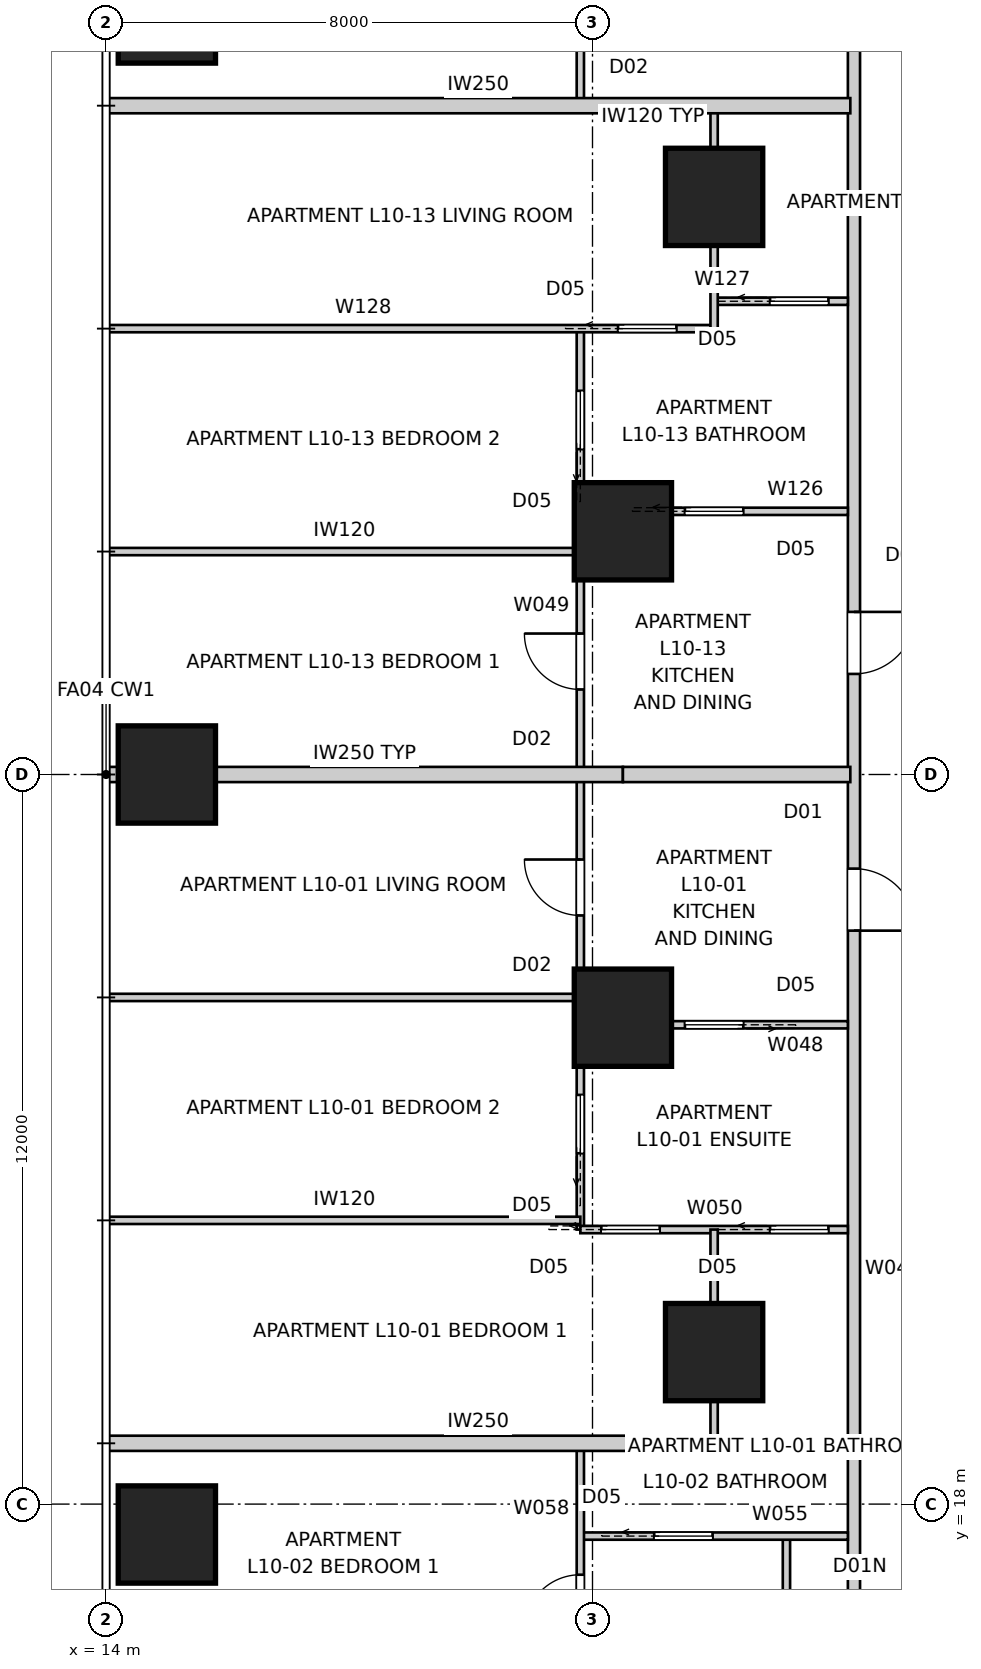
"""IFC4 building model, lengths in metres.
Left out: names, types, materials, properties, quantities, classifications, styles, units other than length and angle.
Written with IfcOpenShell. Run it as: python <this file> out.ifc"""

import sys

from ifc_helpers import new_model, si_unit, direction, frame, frame_2d, origin, origin_2d, place, context, subcontext, project, spatial, rectangle, extrude, element, fill, save


model = new_model("IFC4")
c1 = context("Model", 3, precision=1e-05, world=origin(), true_north=direction((0.0, 1.0)))
c2 = subcontext(c1, "Body", "Model", "MODEL_VIEW")
j1 = project(units=[si_unit("LENGTHUNIT", "METRE"), si_unit("PLANEANGLEUNIT", "RADIAN")], contexts=[c1])
p1 = place(None, origin())
s1 = spatial("IfcSite", under=j1, at=p1, CompositionType="ELEMENT")
p2 = place(p1, origin())
s2 = spatial("IfcBuilding", under=s1, at=p2, CompositionType="ELEMENT")
p3 = place(p2, frame((0.0, 0.0, 38.8)))
s3 = spatial("IfcBuildingStorey", under=s2, at=p3, CompositionType="ELEMENT", Elevation=38.8)
for number, where, z_axis, x_axis in (
    (1, (15.0, 42.5, 0.0), (0.0, 0.0, 1.0), (1.0, 0.0, 0.0)),
    (2, (15.0, 30.0, 0.0), (0.0, 0.0, 1.0), (1.0, 0.0, 0.0)),
    (3, (15.0, 17.5, 0.0), (0.0, 0.0, 1.0), (1.0, 0.0, 0.0)),
):
    element("IfcColumn", number, at=place(p3, frame(where, z_axis=z_axis, x_axis=x_axis)), inside=s3, PredefinedType="COLUMN", context=c2, shape_type="SweptSolid", body=[
        extrude(rectangle(XDim=1.6, YDim=1.6, at=origin_2d()), origin(), (0.0, 0.0, 1.0), 3.2),
    ])
for number, where, z_axis, x_axis in (
    (4, (24.0, 39.5, 0.0), (0.0, 0.0, 1.0), (1.0, 0.0, 0.0)),
    (5, (22.5, 34.0, 0.0), (0.0, 0.0, 1.0), (1.0, 0.0, 0.0)),
    (6, (22.5, 26.0, 0.0), (0.0, 0.0, 1.0), (1.0, 0.0, 0.0)),
    (7, (24.0, 20.5, 0.0), (0.0, 0.0, 1.0), (1.0, 0.0, 0.0)),
):
    element("IfcColumn", number, at=place(p3, frame(where, z_axis=z_axis, x_axis=x_axis)), inside=s3, PredefinedType="COLUMN", context=c2, shape_type="SweptSolid", body=[
        extrude(rectangle(XDim=1.6, YDim=1.6, at=origin_2d()), origin(), (0.0, 0.0, 1.0), 3.4),
    ])
p4 = place(p3, frame((26.3, 44.5, 0.0), z_axis=(0.0, 0.0, 1.0), x_axis=(0.0, -1.0, 0.0)))
e8 = element("IfcWall", 8, at=p4, inside=s3, PredefinedType="PARTITIONING", context=c2, shape_type="SweptSolid", body=[
    extrude(rectangle(XDim=28.2, YDim=0.2, at=frame_2d((14.1, 0.0))), origin(), (0.0, 0.0, 1.0), 3.2),
])
p5 = place(p4, frame((11.826, 0.0, 0.0)))
e9 = element("IfcOpeningElement", 9, at=p5, cuts=e8, PredefinedType="OPENING", context=c2, shape_type="SweptSolid", body=[
    extrude(rectangle(XDim=1.02, YDim=2.34, at=frame_2d((0.51, 1.17))), frame((0.0, 0.11, 0.0), z_axis=(0.0, -1.0, 0.0), x_axis=(1.0, 0.0, 0.0)), (0.0, 0.0, 1.0), 0.22),
])
p6 = place(p4, frame((16.048, 0.0, 0.0)))
e10 = element("IfcOpeningElement", 10, at=p6, cuts=e8, PredefinedType="OPENING", context=c2, shape_type="SweptSolid", body=[
    extrude(rectangle(XDim=1.02, YDim=2.34, at=frame_2d((0.51, 1.17))), frame((0.0, 0.11, 0.0), z_axis=(0.0, -1.0, 0.0), x_axis=(1.0, 0.0, 0.0)), (0.0, 0.0, 1.0), 0.22),
])
p7 = place(p4, frame((1.415, 0.0, 0.0)))
e11 = element("IfcOpeningElement", 11, at=p7, cuts=e8, PredefinedType="OPENING", context=c2, shape_type="SweptSolid", body=[
    extrude(rectangle(XDim=1.02, YDim=2.0, at=frame_2d((0.51, 1.0))), frame((0.0, 0.11, 0.0), z_axis=(0.0, -1.0, 0.0), x_axis=(1.0, 0.0, 0.0)), (0.0, 0.0, 1.0), 0.22),
])
for number, where, z_axis, x_axis in (
    (12, (14.0, 41.0, 0.0), (0.0, 0.0, 1.0), (1.0, 0.0, 0.0)),
    (13, (14.0, 19.0, 0.0), (0.0, 0.0, 1.0), (1.0, 0.0, 0.0)),
):
    element("IfcWall", number, at=place(p3, frame(where, z_axis=z_axis, x_axis=x_axis)), inside=s3, PredefinedType="PARTITIONING", context=c2, shape_type="SweptSolid", body=[
        extrude(rectangle(XDim=12.24, YDim=0.25, at=frame_2d((6.12, 0.0))), origin(), (0.0, 0.0, 1.0), 3.2),
    ])
p8 = place(p3, frame((14.0, 30.0, 0.0), z_axis=(0.0, 0.0, 1.0), x_axis=(1.0, 0.0, 0.0)))
e14 = element("IfcWall", 14, at=p8, inside=s3, PredefinedType="PARTITIONING", context=c2, shape_type="SweptSolid", body=[
    extrude(rectangle(XDim=8.5, YDim=0.25, at=frame_2d((4.25, 0.0))), origin(), (0.0, 0.0, 1.0), 3.2),
])
p9 = place(p3, frame((22.5, 30.0, 0.0), z_axis=(0.0, 0.0, 1.0), x_axis=(1.0, 0.0, 0.0)))
e15 = element("IfcWall", 15, at=p9, inside=s3, PredefinedType="PARTITIONING", context=c2, shape_type="SweptSolid", body=[
    extrude(rectangle(XDim=3.74, YDim=0.25, at=frame_2d((1.87, 0.0))), origin(), (0.0, 0.0, 1.0), 2.671),
])
p10 = place(p3, frame((26.2, 25.884, 0.0), z_axis=(0.0, 0.0, 1.0), x_axis=(-1.0, 0.0, 0.0)))
e16 = element("IfcWall", 16, at=p10, inside=s3, PredefinedType="PARTITIONING", context=c2, shape_type="SweptSolid", body=[
    extrude(rectangle(XDim=4.4, YDim=0.12, at=frame_2d((2.2, 0.0))), origin(), (0.0, 0.0, 1.0), 3.2),
])
p11 = place(p10, frame((1.72, 0.0, 0.0)))
e17 = element("IfcOpeningElement", 17, at=p11, cuts=e16, PredefinedType="OPENING", context=c2, shape_type="SweptSolid", body=[
    extrude(rectangle(XDim=0.96, YDim=2.1, at=frame_2d((0.48, 1.05))), frame((0.0, 0.07, 0.0), z_axis=(0.0, -1.0, 0.0), x_axis=(1.0, 0.0, 0.0)), (0.0, 0.0, 1.0), 0.14),
])
p12 = place(p3, frame((21.8, 22.515, 0.0), z_axis=(0.0, 0.0, 1.0), x_axis=(0.0, 1.0, 0.0)))
e18 = element("IfcWall", 18, at=p12, inside=s3, PredefinedType="PARTITIONING", context=c2, shape_type="SweptSolid", body=[
    extrude(rectangle(XDim=14.818, YDim=0.12, at=frame_2d((7.409, 0.0))), origin(), (0.0, 0.0, 1.0), 3.2),
])
p13 = place(p12, frame((8.883, 0.0, 0.0)))
e19 = element("IfcOpeningElement", 19, at=p13, cuts=e18, PredefinedType="OPENING", context=c2, shape_type="SweptSolid", body=[
    extrude(rectangle(XDim=0.92, YDim=2.34, at=frame_2d((0.46, 1.17))), frame((0.0, 0.07, 0.0), z_axis=(0.0, -1.0, 0.0), x_axis=(1.0, 0.0, 0.0)), (0.0, 0.0, 1.0), 0.14),
])
p14 = place(p12, frame((5.166, 0.0, 0.0)))
e20 = element("IfcOpeningElement", 20, at=p14, cuts=e18, PredefinedType="OPENING", context=c2, shape_type="SweptSolid", body=[
    extrude(rectangle(XDim=0.92, YDim=2.34, at=frame_2d((0.46, 1.17))), frame((0.0, 0.07, 0.0), z_axis=(0.0, -1.0, 0.0), x_axis=(1.0, 0.0, 0.0)), (0.0, 0.0, 1.0), 0.14),
])
p15 = place(p12, frame((12.835, 0.0, 0.0)))
e21 = element("IfcOpeningElement", 21, at=p15, cuts=e18, PredefinedType="OPENING", context=c2, shape_type="SweptSolid", body=[
    extrude(rectangle(XDim=0.96, YDim=2.1, at=frame_2d((0.48, 1.05))), frame((0.0, 0.07, 0.0), z_axis=(0.0, -1.0, 0.0), x_axis=(1.0, 0.0, 0.0)), (0.0, 0.0, 1.0), 0.14),
])
p16 = place(p12, frame((1.255, 0.0, 0.0)))
e22 = element("IfcOpeningElement", 22, at=p16, cuts=e18, PredefinedType="OPENING", context=c2, shape_type="SweptSolid", body=[
    extrude(rectangle(XDim=0.96, YDim=2.1, at=frame_2d((0.48, 1.05))), frame((0.0, 0.07, 0.0), z_axis=(0.0, -1.0, 0.0), x_axis=(1.0, 0.0, 0.0)), (0.0, 0.0, 1.0), 0.14),
])
p17 = place(p3, frame((21.8, 22.515, 0.0), z_axis=(0.0, 0.0, 1.0), x_axis=(1.0, 0.0, 0.0)))
e23 = element("IfcWall", 23, at=p17, inside=s3, PredefinedType="PARTITIONING", context=c2, shape_type="SweptSolid", body=[
    extrude(rectangle(XDim=4.4, YDim=0.12, at=frame_2d((2.2, 0.0))), origin(), (0.0, 0.0, 1.0), 3.2),
])
p18 = place(p17, frame((0.345, 0.0, 0.0)))
e24 = element("IfcOpeningElement", 24, at=p18, cuts=e23, PredefinedType="OPENING", context=c2, shape_type="SweptSolid", body=[
    extrude(rectangle(XDim=0.96, YDim=2.1, at=frame_2d((0.48, 1.05))), frame((0.0, 0.07, 0.0), z_axis=(0.0, -1.0, 0.0), x_axis=(1.0, 0.0, 0.0)), (0.0, 0.0, 1.0), 0.14),
])
p19 = place(p17, frame((3.12, 0.0, 0.0)))
e25 = element("IfcOpeningElement", 25, at=p19, cuts=e23, PredefinedType="OPENING", context=c2, shape_type="SweptSolid", body=[
    extrude(rectangle(XDim=0.96, YDim=2.1, at=frame_2d((0.48, 1.05))), frame((0.0, 0.07, 0.0), z_axis=(0.0, -1.0, 0.0), x_axis=(1.0, 0.0, 0.0)), (0.0, 0.0, 1.0), 0.14),
])
p20 = place(p3, frame((24.0, 19.0, 0.0), z_axis=(0.0, 0.0, 1.0), x_axis=(0.0, 1.0, 0.0)))
e26 = element("IfcWall", 26, at=p20, inside=s3, PredefinedType="PARTITIONING", context=c2, shape_type="SweptSolid", body=[
    extrude(rectangle(XDim=3.515, YDim=0.12, at=frame_2d((1.758, 0.0))), origin(), (0.0, 0.0, 1.0), 2.2),
])
for number, where, z_axis, x_axis in (
    (27, (21.8, 26.333, 0.0), (0.0, 0.0, 1.0), (-1.0, 0.0, 0.0)),
    (28, (14.04, 22.667, 0.0), (0.0, 0.0, 1.0), (1.0, 0.0, 0.0)),
):
    element("IfcWall", number, at=place(p3, frame(where, z_axis=z_axis, x_axis=x_axis)), inside=s3, PredefinedType="PARTITIONING", context=c2, shape_type="SweptSolid", body=[
        extrude(rectangle(XDim=7.76, YDim=0.12, at=frame_2d((3.88, 0.0))), origin(), (0.0, 0.0, 1.0), 3.2),
    ])
p21 = place(p3, frame((25.189, 11.8, 0.0), z_axis=(0.0, 0.0, 1.0), x_axis=(0.0, 1.0, 0.0)))
e29 = element("IfcWall", 29, at=p21, inside=s3, PredefinedType="PARTITIONING", context=c2, shape_type="SweptSolid", body=[
    extrude(rectangle(XDim=5.674, YDim=0.12, at=frame_2d((2.837, 0.0))), origin(), (0.0, 0.0, 1.0), 3.2),
])
p22 = place(p21, frame((2.377, 0.0, 0.0)))
e30 = element("IfcOpeningElement", 30, at=p22, cuts=e29, PredefinedType="OPENING", context=c2, shape_type="SweptSolid", body=[
    extrude(rectangle(XDim=0.92, YDim=2.0, at=frame_2d((0.46, 1.0))), frame((0.0, 0.07, 0.0), z_axis=(0.0, -1.0, 0.0), x_axis=(1.0, 0.0, 0.0)), (0.0, 0.0, 1.0), 0.14),
])
p23 = place(p3, frame((21.8, 17.474, 0.0), z_axis=(0.0, 0.0, 1.0), x_axis=(1.0, 0.0, 0.0)))
e31 = element("IfcWall", 31, at=p23, inside=s3, PredefinedType="PARTITIONING", context=c2, shape_type="SweptSolid", body=[
    extrude(rectangle(XDim=4.4, YDim=0.12, at=frame_2d((2.2, 0.0))), origin(), (0.0, 0.0, 1.0), 3.2),
])
p24 = place(p23, frame((1.215, 0.0, 0.0)))
e32 = element("IfcOpeningElement", 32, at=p24, cuts=e31, PredefinedType="OPENING", context=c2, shape_type="SweptSolid", body=[
    extrude(rectangle(XDim=0.96, YDim=2.1, at=frame_2d((0.48, 1.05))), frame((0.0, 0.07, 0.0), z_axis=(0.0, -1.0, 0.0), x_axis=(1.0, 0.0, 0.0)), (0.0, 0.0, 1.0), 0.14),
])
p25 = place(p3, frame((21.8, 11.8, 0.0), z_axis=(0.0, 0.0, 1.0), x_axis=(0.0, 1.0, 0.0)))
e33 = element("IfcWall", 33, at=p25, inside=s3, PredefinedType="PARTITIONING", context=c2, shape_type="SweptSolid", body=[
    extrude(rectangle(XDim=7.2, YDim=0.12, at=frame_2d((3.6, 0.0))), origin(), (0.0, 0.0, 1.0), 3.2),
])
p26 = place(p25, frame((1.332, 0.0, 0.0)))
e34 = element("IfcOpeningElement", 34, at=p26, cuts=e33, PredefinedType="OPENING", context=c2, shape_type="SweptSolid", body=[
    extrude(rectangle(XDim=0.92, YDim=2.34, at=frame_2d((0.46, 1.17))), frame((0.0, 0.07, 0.0), z_axis=(0.0, -1.0, 0.0), x_axis=(1.0, 0.0, 0.0)), (0.0, 0.0, 1.0), 0.14),
])
p27 = place(p25, frame((4.119, 0.0, 0.0)))
e35 = element("IfcOpeningElement", 35, at=p27, cuts=e33, PredefinedType="OPENING", context=c2, shape_type="SweptSolid", body=[
    extrude(rectangle(XDim=0.92, YDim=2.34, at=frame_2d((0.46, 1.17))), frame((0.0, 0.07, 0.0), z_axis=(0.0, -1.0, 0.0), x_axis=(1.0, 0.0, 0.0)), (0.0, 0.0, 1.0), 0.14),
])
p28 = place(p3, frame((21.8, 41.0, 0.0), z_axis=(0.0, 0.0, 1.0), x_axis=(0.0, 1.0, 0.0)))
e36 = element("IfcWall", 36, at=p28, inside=s3, PredefinedType="PARTITIONING", context=c2, shape_type="SweptSolid", body=[
    extrude(rectangle(XDim=7.2, YDim=0.12, at=frame_2d((3.6, 0.0))), origin(), (0.0, 0.0, 1.0), 3.2),
])
p29 = place(p28, frame((1.45, 0.0, 0.0)))
e37 = element("IfcOpeningElement", 37, at=p29, cuts=e36, PredefinedType="OPENING", context=c2, shape_type="SweptSolid", body=[
    extrude(rectangle(XDim=0.92, YDim=2.34, at=frame_2d((0.46, 1.17))), frame((0.0, 0.07, 0.0), z_axis=(0.0, -1.0, 0.0), x_axis=(1.0, 0.0, 0.0)), (0.0, 0.0, 1.0), 0.14),
])
p30 = place(p3, frame((21.8, 34.328, 0.0), z_axis=(0.0, 0.0, 1.0), x_axis=(1.0, 0.0, 0.0)))
e38 = element("IfcWall", 38, at=p30, inside=s3, PredefinedType="PARTITIONING", context=c2, shape_type="SweptSolid", body=[
    extrude(rectangle(XDim=4.4, YDim=0.12, at=frame_2d((2.2, 0.0))), origin(), (0.0, 0.0, 1.0), 3.2),
])
p31 = place(p30, frame((1.72, 0.0, 0.0)))
e39 = element("IfcOpeningElement", 39, at=p31, cuts=e38, PredefinedType="OPENING", context=c2, shape_type="SweptSolid", body=[
    extrude(rectangle(XDim=0.96, YDim=2.1, at=frame_2d((0.48, 1.05))), frame((0.0, 0.07, 0.0), z_axis=(0.0, -1.0, 0.0), x_axis=(1.0, 0.0, 0.0)), (0.0, 0.0, 1.0), 0.14),
])
p32 = place(p3, frame((24.0, 37.783, 0.0), z_axis=(0.0, 0.0, 1.0), x_axis=(1.0, 0.0, 0.0)))
e40 = element("IfcWall", 40, at=p32, inside=s3, PredefinedType="PARTITIONING", context=c2, shape_type="SweptSolid", body=[
    extrude(rectangle(XDim=2.2, YDim=0.12, at=frame_2d((1.1, 0.0))), origin(), (0.0, 0.0, 1.0), 3.2),
])
p33 = place(p32, frame((0.92, 0.0, 0.0)))
e41 = element("IfcOpeningElement", 41, at=p33, cuts=e40, PredefinedType="OPENING", context=c2, shape_type="SweptSolid", body=[
    extrude(rectangle(XDim=0.96, YDim=2.1, at=frame_2d((0.48, 1.05))), frame((0.0, 0.07, 0.0), z_axis=(0.0, -1.0, 0.0), x_axis=(1.0, 0.0, 0.0)), (0.0, 0.0, 1.0), 0.14),
])
p34 = place(p3, frame((14.04, 37.333, 0.0), z_axis=(0.0, 0.0, 1.0), x_axis=(1.0, 0.0, 0.0)))
e42 = element("IfcWall", 42, at=p34, inside=s3, PredefinedType="PARTITIONING", context=c2, shape_type="SweptSolid", body=[
    extrude(rectangle(XDim=9.96, YDim=0.12, at=frame_2d((4.98, 0.0))), origin(), (0.0, 0.0, 1.0), 3.2),
])
p35 = place(p34, frame((8.38, 0.0, 0.0)))
e43 = element("IfcOpeningElement", 43, at=p35, cuts=e42, PredefinedType="OPENING", context=c2, shape_type="SweptSolid", body=[
    extrude(rectangle(XDim=0.96, YDim=2.1, at=frame_2d((0.48, 1.05))), frame((0.0, 0.07, 0.0), z_axis=(0.0, -1.0, 0.0), x_axis=(1.0, 0.0, 0.0)), (0.0, 0.0, 1.0), 0.14),
])
p36 = place(p3, frame((24.0, 37.333, 0.0), z_axis=(0.0, 0.0, 1.0), x_axis=(0.0, 1.0, 0.0)))
e44 = element("IfcWall", 44, at=p36, inside=s3, PredefinedType="PARTITIONING", context=c2, shape_type="SweptSolid", body=[
    extrude(rectangle(XDim=3.667, YDim=0.12, at=frame_2d((1.833, 0.0))), origin(), (0.0, 0.0, 1.0), 2.2),
])
p37 = place(p3, frame((14.04, 33.667, 0.0), z_axis=(0.0, 0.0, 1.0), x_axis=(1.0, 0.0, 0.0)))
e45 = element("IfcWall", 45, at=p37, inside=s3, PredefinedType="PARTITIONING", context=c2, shape_type="SweptSolid", body=[
    extrude(rectangle(XDim=7.76, YDim=0.12, at=frame_2d((3.88, 0.0))), origin(), (0.0, 0.0, 1.0), 3.2),
])
p38 = place(p5, origin())
e46 = element("IfcDoor", 46, at=p38, inside=s3, OperationType="SINGLE_SWING_LEFT", PredefinedType="DOOR", context=c2, shape_type="SweptSolid", body=[
    extrude(rectangle(XDim=1.02, YDim=2.34, at=frame_2d((0.51, 1.17))), frame((0.0, 0.025, 0.0), z_axis=(0.0, -1.0, 0.0), x_axis=(1.0, 0.0, 0.0)), (0.0, 0.0, 1.0), 0.05),
])
fill(e9, e46)
p39 = place(p6, origin())
e47 = element("IfcDoor", 47, at=p39, inside=s3, OperationType="SINGLE_SWING_RIGHT", PredefinedType="DOOR", context=c2, shape_type="SweptSolid", body=[
    extrude(rectangle(XDim=1.02, YDim=2.34, at=frame_2d((0.51, 1.17))), frame((0.0, 0.025, 0.0), z_axis=(0.0, -1.0, 0.0), x_axis=(1.0, 0.0, 0.0)), (0.0, 0.0, 1.0), 0.05),
])
fill(e10, e47)
p40 = place(p31, origin())
e48 = element("IfcDoor", 48, at=p40, inside=s3, OperationType="SLIDING_TO_LEFT", PredefinedType="DOOR", context=c2, shape_type="SweptSolid", body=[
    extrude(rectangle(XDim=0.96, YDim=2.1, at=frame_2d((0.48, 1.05))), frame((0.0, 0.025, 0.0), z_axis=(0.0, -1.0, 0.0), x_axis=(1.0, 0.0, 0.0)), (0.0, 0.0, 1.0), 0.05),
])
fill(e39, e48)
p41 = place(p13, origin())
e49 = element("IfcDoor", 49, at=p41, inside=s3, OperationType="SINGLE_SWING_RIGHT", PredefinedType="DOOR", context=c2, shape_type="SweptSolid", body=[
    extrude(rectangle(XDim=0.92, YDim=2.34, at=frame_2d((0.46, 1.17))), frame((0.0, 0.025, 0.0), z_axis=(0.0, -1.0, 0.0), x_axis=(1.0, 0.0, 0.0)), (0.0, 0.0, 1.0), 0.05),
])
fill(e19, e49)
p42 = place(p11, origin())
e50 = element("IfcDoor", 50, at=p42, inside=s3, OperationType="SLIDING_TO_LEFT", PredefinedType="DOOR", context=c2, shape_type="SweptSolid", body=[
    extrude(rectangle(XDim=0.96, YDim=2.1, at=frame_2d((0.48, 1.05))), frame((0.0, 0.025, 0.0), z_axis=(0.0, -1.0, 0.0), x_axis=(1.0, 0.0, 0.0)), (0.0, 0.0, 1.0), 0.05),
])
fill(e17, e50)
p43 = place(p14, origin())
e51 = element("IfcDoor", 51, at=p43, inside=s3, OperationType="SINGLE_SWING_RIGHT", PredefinedType="DOOR", context=c2, shape_type="SweptSolid", body=[
    extrude(rectangle(XDim=0.92, YDim=2.34, at=frame_2d((0.46, 1.17))), frame((0.0, 0.025, 0.0), z_axis=(0.0, -1.0, 0.0), x_axis=(1.0, 0.0, 0.0)), (0.0, 0.0, 1.0), 0.05),
])
fill(e20, e51)
p44 = place(p15, origin())
e52 = element("IfcDoor", 52, at=p44, inside=s3, OperationType="SLIDING_TO_LEFT", PredefinedType="DOOR", context=c2, shape_type="SweptSolid", body=[
    extrude(rectangle(XDim=0.96, YDim=2.1, at=frame_2d((0.48, 1.05))), frame((0.0, 0.025, 0.0), z_axis=(0.0, -1.0, 0.0), x_axis=(1.0, 0.0, 0.0)), (0.0, 0.0, 1.0), 0.05),
])
fill(e21, e52)
p45 = place(p33, origin())
e53 = element("IfcDoor", 53, at=p45, inside=s3, OperationType="SLIDING_TO_LEFT", PredefinedType="DOOR", context=c2, shape_type="SweptSolid", body=[
    extrude(rectangle(XDim=0.96, YDim=2.1, at=frame_2d((0.48, 1.05))), frame((0.0, 0.025, 0.0), z_axis=(0.0, -1.0, 0.0), x_axis=(1.0, 0.0, 0.0)), (0.0, 0.0, 1.0), 0.05),
])
fill(e41, e53)
p46 = place(p35, origin())
e54 = element("IfcDoor", 54, at=p46, inside=s3, OperationType="SLIDING_TO_LEFT", PredefinedType="DOOR", context=c2, shape_type="SweptSolid", body=[
    extrude(rectangle(XDim=0.96, YDim=2.1, at=frame_2d((0.48, 1.05))), frame((0.0, 0.025, 0.0), z_axis=(0.0, -1.0, 0.0), x_axis=(1.0, 0.0, 0.0)), (0.0, 0.0, 1.0), 0.05),
])
fill(e43, e54)
p47 = place(p16, origin())
e55 = element("IfcDoor", 55, at=p47, inside=s3, OperationType="SLIDING_TO_LEFT", PredefinedType="DOOR", context=c2, shape_type="SweptSolid", body=[
    extrude(rectangle(XDim=0.96, YDim=2.1, at=frame_2d((0.48, 1.05))), frame((0.0, 0.025, 0.0), z_axis=(0.0, -1.0, 0.0), x_axis=(1.0, 0.0, 0.0)), (0.0, 0.0, 1.0), 0.05),
])
fill(e22, e55)
p48 = place(p18, origin())
e56 = element("IfcDoor", 56, at=p48, inside=s3, OperationType="SLIDING_TO_LEFT", PredefinedType="DOOR", context=c2, shape_type="SweptSolid", body=[
    extrude(rectangle(XDim=0.96, YDim=2.1, at=frame_2d((0.48, 1.05))), frame((0.0, 0.025, 0.0), z_axis=(0.0, -1.0, 0.0), x_axis=(1.0, 0.0, 0.0)), (0.0, 0.0, 1.0), 0.05),
])
fill(e24, e56)
p49 = place(p19, origin())
e57 = element("IfcDoor", 57, at=p49, inside=s3, OperationType="SLIDING_TO_LEFT", PredefinedType="DOOR", context=c2, shape_type="SweptSolid", body=[
    extrude(rectangle(XDim=0.96, YDim=2.1, at=frame_2d((0.48, 1.05))), frame((0.0, 0.025, 0.0), z_axis=(0.0, -1.0, 0.0), x_axis=(1.0, 0.0, 0.0)), (0.0, 0.0, 1.0), 0.05),
])
fill(e25, e57)
p50 = place(p24, origin())
e58 = element("IfcDoor", 58, at=p50, inside=s3, OperationType="SLIDING_TO_LEFT", PredefinedType="DOOR", context=c2, shape_type="SweptSolid", body=[
    extrude(rectangle(XDim=0.96, YDim=2.1, at=frame_2d((0.48, 1.05))), frame((0.0, 0.025, 0.0), z_axis=(0.0, -1.0, 0.0), x_axis=(1.0, 0.0, 0.0)), (0.0, 0.0, 1.0), 0.05),
])
fill(e32, e58)
p51 = place(p27, origin())
e59 = element("IfcDoor", 59, at=p51, inside=s3, OperationType="SINGLE_SWING_LEFT", PredefinedType="DOOR", context=c2, shape_type="SweptSolid", body=[
    extrude(rectangle(XDim=0.92, YDim=2.34, at=frame_2d((0.46, 1.17))), frame((0.0, 0.025, 0.0), z_axis=(0.0, -1.0, 0.0), x_axis=(1.0, 0.0, 0.0)), (0.0, 0.0, 1.0), 0.05),
])
fill(e35, e59)
save(model, sys.argv[1])
